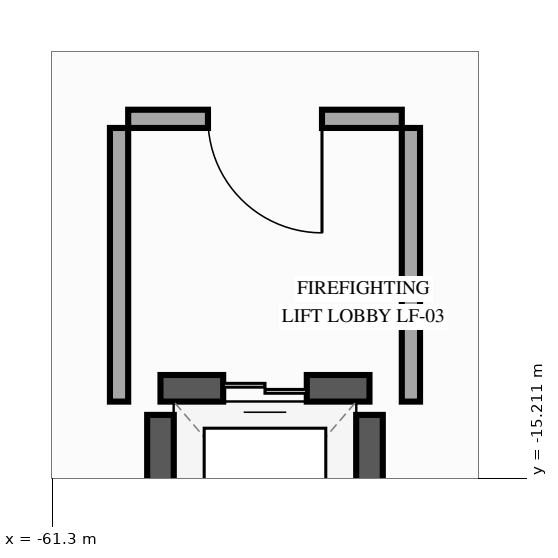
"""IFC4 building model, lengths in metres.
Left out: names, types, materials, properties, quantities, classifications, styles, units other than length and angle.
Written with IfcOpenShell. Run it as: python <this file> out.ifc"""

import sys

from ifc_helpers import new_model, si_unit, direction, frame, frame_2d, origin, place, context, subcontext, project, spatial, rectangle, extrude, element, fill, save


model = new_model("IFC4")
c1 = context("Model", 3, precision=1e-05, world=origin(), true_north=direction((0.0, 1.0)))
c2 = subcontext(c1, "Body", "Model", "MODEL_VIEW")
j1 = project(units=[si_unit("LENGTHUNIT", "METRE"), si_unit("PLANEANGLEUNIT", "RADIAN")], contexts=[c1])
p1 = place(None, origin())
s1 = spatial("IfcSite", under=j1, at=p1, CompositionType="ELEMENT")
p2 = place(p1, origin())
s2 = spatial("IfcBuilding", under=s1, at=p2, CompositionType="ELEMENT")
p3 = place(p2, frame((0.0, 0.0, 16.2)))
s3 = spatial("IfcBuildingStorey", under=s2, at=p3, CompositionType="ELEMENT", Elevation=16.2)
p4 = place(p3, frame((-57.125, -14.025, 0.0), z_axis=(0.0, 0.0, 1.0), x_axis=(-1.0, 0.0, 0.0)))
e1 = element("IfcWall", 1, at=p4, inside=s3, PredefinedType="SHEAR", context=c2, shape_type="SweptSolid", body=[
    extrude(rectangle(XDim=2.75, YDim=0.35, at=frame_2d((1.375, 0.0))), origin(), (0.0, 0.0, 1.0), 5.15),
])
p5 = place(p4, frame((0.825, 0.0, 0.0)))
e2 = element("IfcOpeningElement", 2, at=p5, cuts=e1, PredefinedType="OPENING", context=c2, shape_type="SweptSolid", body=[
    extrude(rectangle(XDim=1.1, YDim=2.2, at=frame_2d((0.55, 1.1))), frame((0.0, 0.185, 0.0), z_axis=(0.0, -1.0, 0.0), x_axis=(1.0, 0.0, 0.0)), (0.0, 0.0, 1.0), 0.37),
])
for number, where, z_axis, x_axis in (
    (3, (-59.875, -16.825, 0.0), (0.0, 0.0, 1.0), (0.0, 1.0, 0.0)),
    (4, (-57.125, -16.825, 0.0), (0.0, 0.0, 1.0), (0.0, 1.0, 0.0)),
):
    element("IfcWall", number, at=place(p3, frame(where, z_axis=z_axis, x_axis=x_axis)), inside=s3, PredefinedType="SHEAR", context=c2, shape_type="SweptSolid", body=[
        extrude(rectangle(XDim=2.45, YDim=0.35, at=frame_2d((1.225, 0.0))), origin(), (0.0, 0.0, 1.0), 5.15),
    ])
p6 = place(p3, frame((-56.7, -10.48, 0.0), z_axis=(0.0, 0.0, 1.0), x_axis=(-1.0, 0.0, 0.0)))
e5 = element("IfcWall", 5, at=p6, inside=s3, PredefinedType="PARTITIONING", context=c2, shape_type="SweptSolid", body=[
    extrude(rectangle(XDim=3.6, YDim=0.24, at=frame_2d((1.8, 0.0))), origin(), (0.0, 0.0, 1.0), 5.1),
])
p7 = place(p6, frame((1.05, 0.0, 0.0)))
e6 = element("IfcOpeningElement", 6, at=p7, cuts=e5, PredefinedType="OPENING", context=c2, shape_type="SweptSolid", body=[
    extrude(rectangle(XDim=1.5, YDim=2.2, at=frame_2d((0.75, 1.1))), frame((0.0, 0.13, 0.0), z_axis=(0.0, -1.0, 0.0), x_axis=(1.0, 0.0, 0.0)), (0.0, 0.0, 1.0), 0.26),
])
for number, where, z_axis, x_axis in (
    (7, (-60.42, -14.2, 0.0), (0.0, 0.0, 1.0), (0.0, 1.0, 0.0)),
    (8, (-56.58, -14.2, 0.0), (0.0, 0.0, 1.0), (0.0, 1.0, 0.0)),
):
    element("IfcWall", number, at=place(p3, frame(where, z_axis=z_axis, x_axis=x_axis)), inside=s3, PredefinedType="PARTITIONING", context=c2, shape_type="SweptSolid", body=[
        extrude(rectangle(XDim=3.6, YDim=0.24, at=frame_2d((1.8, 0.0))), origin(), (0.0, 0.0, 1.0), 4.785),
    ])
p8 = place(p5, origin())
e9 = element("IfcDoor", 9, at=p8, inside=s3, OperationType="DOUBLE_DOOR_SLIDING", PredefinedType="DOOR", context=c2, shape_type="SweptSolid", body=[
    extrude(rectangle(XDim=1.1, YDim=2.2, at=frame_2d((0.55, 1.1))), frame((0.0, 0.025, 0.0), z_axis=(0.0, -1.0, 0.0), x_axis=(1.0, 0.0, 0.0)), (0.0, 0.0, 1.0), 0.05),
])
fill(e2, e9)
p9 = place(p7, origin())
e10 = element("IfcDoor", 10, at=p9, inside=s3, OperationType="SINGLE_SWING_LEFT", PredefinedType="DOOR", context=c2, shape_type="SweptSolid", body=[
    extrude(rectangle(XDim=1.5, YDim=2.2, at=frame_2d((0.75, 1.1))), frame((0.0, 0.025, 0.0), z_axis=(0.0, -1.0, 0.0), x_axis=(1.0, 0.0, 0.0)), (0.0, 0.0, 1.0), 0.05),
])
fill(e6, e10)
save(model, sys.argv[1])
